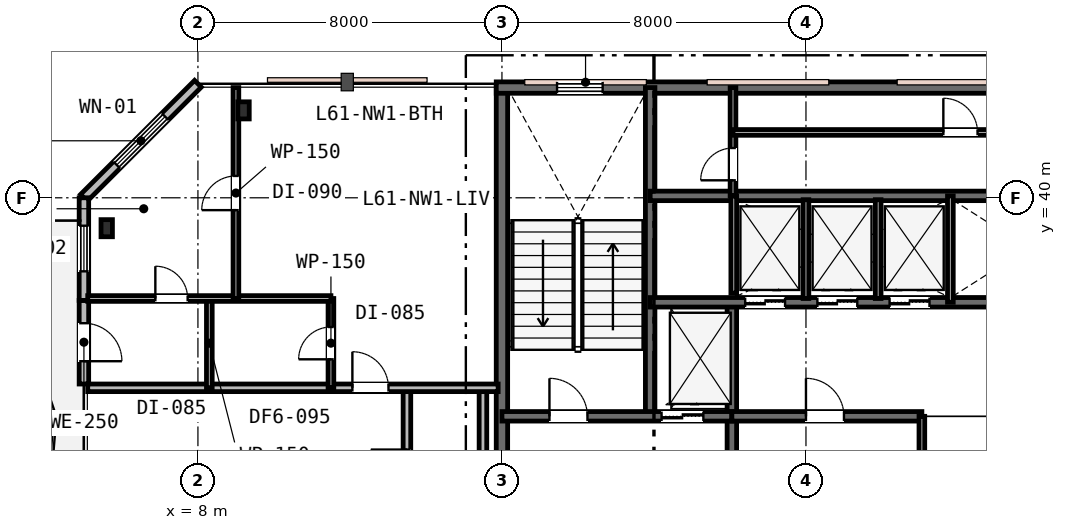
"""IFC4 building model, lengths in metres.
Left out: names, types, materials, properties, quantities, classifications, styles, units other than length and angle.
Written with IfcOpenShell. Run it as: python <this file> out.ifc"""

import sys

from ifc_helpers import new_model, si_unit, direction, frame, frame_2d, origin, origin_2d, place, context, subcontext, project, spatial, rectangle, i_section, extrude, element, fill, save


model = new_model("IFC4")
c1 = context("Model", 3, precision=1e-05, world=origin(), true_north=direction((0.0, 1.0)))
c2 = subcontext(c1, "Body", "Model", "MODEL_VIEW")
j1 = project(units=[si_unit("LENGTHUNIT", "METRE"), si_unit("PLANEANGLEUNIT", "RADIAN")], contexts=[c1])
p1 = place(None, origin())
s1 = spatial("IfcSite", under=j1, at=p1, CompositionType="ELEMENT")
p2 = place(p1, origin())
s2 = spatial("IfcBuilding", under=s1, at=p2, CompositionType="ELEMENT")
p3 = place(p2, frame((0.0, 0.0, 237.4)))
s3 = spatial("IfcBuildingStorey", under=s2, at=p3, CompositionType="ELEMENT", Elevation=237.4)
p4 = place(p3, frame((16.0, 30.65, 0.0), z_axis=(0.0, 0.0, 1.0), x_axis=(0.0, 1.0, 0.0)))
e1 = element("IfcWall", 1, at=p4, inside=s3, PredefinedType="SHEAR", context=c2, shape_type="SweptSolid", body=[
    extrude(rectangle(XDim=12.3, YDim=0.3, at=frame_2d((6.15, 0.0))), origin(), (0.0, 0.0, 1.0), 3.8),
])
p5 = place(p3, frame((15.85, 42.9, 0.0), z_axis=(0.0, 0.0, 1.0), x_axis=(1.0, 0.0, 0.0)))
e2 = element("IfcWall", 2, at=p5, inside=s3, PredefinedType="SHEAR", context=c2, shape_type="SweptSolid", body=[
    extrude(rectangle(XDim=24.3, YDim=0.3, at=frame_2d((12.15, 0.0))), origin(), (0.0, 0.0, 1.0), 3.8),
])
p6 = place(p5, frame((1.6, 0.0, 0.95)))
e3 = element("IfcOpeningElement", 3, at=p6, cuts=e2, PredefinedType="OPENING", context=c2, shape_type="SweptSolid", body=[
    extrude(rectangle(XDim=1.2, YDim=1.6, at=frame_2d((0.6, 0.8))), frame((0.0, 0.16, 0.0), z_axis=(0.0, -1.0, 0.0), x_axis=(1.0, 0.0, 0.0)), (0.0, 0.0, 1.0), 0.32),
])
p7 = place(p5, frame((16.5, 0.0, 0.95)))
e4 = element("IfcOpeningElement", 4, at=p7, cuts=e2, PredefinedType="OPENING", context=c2, shape_type="SweptSolid", body=[
    extrude(rectangle(XDim=1.2, YDim=1.6, at=frame_2d((0.6, 0.8))), frame((0.0, 0.16, 0.0), z_axis=(0.0, -1.0, 0.0), x_axis=(1.0, 0.0, 0.0)), (0.0, 0.0, 1.0), 0.32),
])
p8 = place(p5, frame((21.6, 0.0, 0.95)))
e5 = element("IfcOpeningElement", 5, at=p8, cuts=e2, PredefinedType="OPENING", context=c2, shape_type="SweptSolid", body=[
    extrude(rectangle(XDim=1.2, YDim=1.6, at=frame_2d((0.6, 0.8))), frame((0.0, 0.16, 0.0), z_axis=(0.0, -1.0, 0.0), x_axis=(1.0, 0.0, 0.0)), (0.0, 0.0, 1.0), 0.32),
])
p9 = place(p3, frame((19.9, 34.25, 0.0), z_axis=(0.0, 0.0, 1.0), x_axis=(0.0, 1.0, 0.0)))
e6 = element("IfcWall", 6, at=p9, inside=s3, PredefinedType="SHEAR", context=c2, shape_type="SweptSolid", body=[
    extrude(rectangle(XDim=8.65, YDim=0.25, at=frame_2d((4.325, 0.0))), origin(), (0.0, 0.0, 1.0), 3.8),
])
p10 = place(p3, frame((22.05, 30.8, 0.0), z_axis=(0.0, 0.0, 1.0), x_axis=(0.0, 1.0, 0.0)))
e7 = element("IfcWall", 7, at=p10, inside=s3, PredefinedType="SHEAR", context=c2, shape_type="SweptSolid", body=[
    extrude(rectangle(XDim=6.45, YDim=0.25, at=frame_2d((3.225, 0.0))), origin(), (0.0, 0.0, 1.0), 3.8),
])
p11 = place(p3, frame((16.0, 34.25, 0.0), z_axis=(0.0, 0.0, 1.0), x_axis=(1.0, 0.0, 0.0)))
e8 = element("IfcWall", 8, at=p11, inside=s3, PredefinedType="SHEAR", context=c2, shape_type="SweptSolid", body=[
    extrude(rectangle(XDim=6.05, YDim=0.25, at=frame_2d((3.025, 0.0))), origin(), (0.0, 0.0, 1.0), 3.8),
])
p12 = place(p11, frame((1.25, 0.0, 0.0)))
e9 = element("IfcOpeningElement", 9, at=p12, cuts=e8, PredefinedType="OPENING", context=c2, shape_type="SweptSolid", body=[
    extrude(rectangle(XDim=1.0, YDim=2.15, at=frame_2d((0.5, 1.075))), frame((0.0, 0.135, 0.0), z_axis=(0.0, -1.0, 0.0), x_axis=(1.0, 0.0, 0.0)), (0.0, 0.0, 1.0), 0.27),
])
p13 = place(p11, frame((4.2, 0.0, 0.0)))
e10 = element("IfcOpeningElement", 10, at=p13, cuts=e8, PredefinedType="OPENING", context=c2, shape_type="SweptSolid", body=[
    extrude(rectangle(XDim=1.1, YDim=2.15, at=frame_2d((0.55, 1.075))), frame((0.0, 0.135, 0.0), z_axis=(0.0, -1.0, 0.0), x_axis=(1.0, 0.0, 0.0)), (0.0, 0.0, 1.0), 0.27),
])
p14 = place(p3, frame((22.05, 34.25, 0.0), z_axis=(0.0, 0.0, 1.0), x_axis=(1.0, 0.0, 0.0)))
e11 = element("IfcWall", 11, at=p14, inside=s3, PredefinedType="SHEAR", context=c2, shape_type="SweptSolid", body=[
    extrude(rectangle(XDim=5.0, YDim=0.25, at=frame_2d((2.5, 0.0))), origin(), (0.0, 0.0, 1.0), 3.8),
])
p15 = place(p14, frame((1.95, 0.0, 0.0)))
e12 = element("IfcOpeningElement", 12, at=p15, cuts=e11, PredefinedType="OPENING", context=c2, shape_type="SweptSolid", body=[
    extrude(rectangle(XDim=1.0, YDim=2.15, at=frame_2d((0.5, 1.075))), frame((0.0, 0.135, 0.0), z_axis=(0.0, -1.0, 0.0), x_axis=(1.0, 0.0, 0.0)), (0.0, 0.0, 1.0), 0.27),
])
p16 = place(p3, frame((19.9, 37.25, 0.0), z_axis=(0.0, 0.0, 1.0), x_axis=(1.0, 0.0, 0.0)))
e13 = element("IfcWall", 13, at=p16, inside=s3, PredefinedType="SHEAR", context=c2, shape_type="SweptSolid", body=[
    extrude(rectangle(XDim=16.2, YDim=0.25, at=frame_2d((8.1, 0.0))), origin(), (0.0, 0.0, 1.0), 3.8),
])
p17 = place(p16, frame((12.55, 0.0, 0.0)))
e14 = element("IfcOpeningElement", 14, at=p17, cuts=e13, PredefinedType="OPENING", context=c2, shape_type="SweptSolid", body=[
    extrude(rectangle(XDim=0.9, YDim=2.15, at=frame_2d((0.45, 1.075))), frame((0.0, 0.135, 0.0), z_axis=(0.0, -1.0, 0.0), x_axis=(1.0, 0.0, 0.0)), (0.0, 0.0, 1.0), 0.27),
])
p18 = place(p16, frame((2.5, 0.0, 0.0)))
e15 = element("IfcOpeningElement", 15, at=p18, cuts=e13, PredefinedType="OPENING", context=c2, shape_type="SweptSolid", body=[
    extrude(rectangle(XDim=1.05, YDim=2.15, at=frame_2d((0.525, 1.075))), frame((0.0, 0.135, 0.0), z_axis=(0.0, -1.0, 0.0), x_axis=(1.0, 0.0, 0.0)), (0.0, 0.0, 1.0), 0.27),
])
p19 = place(p16, frame((4.4, 0.0, 0.0)))
e16 = element("IfcOpeningElement", 16, at=p19, cuts=e13, PredefinedType="OPENING", context=c2, shape_type="SweptSolid", body=[
    extrude(rectangle(XDim=1.05, YDim=2.15, at=frame_2d((0.525, 1.075))), frame((0.0, 0.135, 0.0), z_axis=(0.0, -1.0, 0.0), x_axis=(1.0, 0.0, 0.0)), (0.0, 0.0, 1.0), 0.27),
])
p20 = place(p16, frame((6.3, 0.0, 0.0)))
e17 = element("IfcOpeningElement", 17, at=p20, cuts=e13, PredefinedType="OPENING", context=c2, shape_type="SweptSolid", body=[
    extrude(rectangle(XDim=1.05, YDim=2.15, at=frame_2d((0.525, 1.075))), frame((0.0, 0.135, 0.0), z_axis=(0.0, -1.0, 0.0), x_axis=(1.0, 0.0, 0.0)), (0.0, 0.0, 1.0), 0.27),
])
p21 = place(p3, frame((19.9, 40.05, 0.0), z_axis=(0.0, 0.0, 1.0), x_axis=(1.0, 0.0, 0.0)))
e18 = element("IfcWall", 18, at=p21, inside=s3, PredefinedType="SHEAR", context=c2, shape_type="SweptSolid", body=[
    extrude(rectangle(XDim=12.05, YDim=0.25, at=frame_2d((6.025, 0.0))), origin(), (0.0, 0.0, 1.0), 3.8),
])
for number, where, z_axis, x_axis in (
    (19, (5.6, 39.2, 0.0), (0.0, 0.0, 1.0), (1.0, 0.0, 0.0)),
    (20, (9.2, 42.3, 0.0), (0.0, 0.0, 1.0), (1.0, 0.0, 0.0)),
):
    element("IfcColumn", number, at=place(p3, frame(where, z_axis=z_axis, x_axis=x_axis)), inside=s3, PredefinedType="COLUMN", context=c2, shape_type="SweptSolid", body=[
        extrude(i_section(OverallWidth=0.3, OverallDepth=0.45, WebThickness=0.014, FlangeThickness=0.026, FilletRadius=0.027, at=origin_2d()), origin(), (0.0, 0.0, 1.0), 3.8),
    ])
p22 = place(p3, frame((8.0, 43.0, 0.0), z_axis=(0.0, 0.0, 1.0), x_axis=(-0.707106781187, -0.707106781187, 0.0)))
e21 = element("IfcWall", 21, at=p22, inside=s3, PredefinedType="STANDARD", context=c2, shape_type="SweptSolid", body=[
    extrude(rectangle(XDim=4.243, YDim=0.25, at=frame_2d((2.121, 0.0))), origin(), (0.0, 0.0, 1.0), 3.53),
])
p23 = place(p22, frame((1.221, 0.0, 0.75)))
e22 = element("IfcOpeningElement", 22, at=p23, cuts=e21, PredefinedType="OPENING", context=c2, shape_type="SweptSolid", body=[
    extrude(rectangle(XDim=1.8, YDim=1.85, at=frame_2d((0.9, 0.925))), frame((0.0, 0.135, 0.0), z_axis=(0.0, -1.0, 0.0), x_axis=(1.0, 0.0, 0.0)), (0.0, 0.0, 1.0), 0.27),
])
p24 = place(p3, frame((5.0, 37.3, 0.0), z_axis=(0.0, 0.0, 1.0), x_axis=(0.0, -1.0, 0.0)))
e23 = element("IfcWall", 23, at=p24, inside=s3, PredefinedType="STANDARD", context=c2, shape_type="SweptSolid", body=[
    extrude(rectangle(XDim=2.2, YDim=0.25, at=frame_2d((1.1, 0.0))), origin(), (0.0, 0.0, 1.0), 3.53),
])
p25 = place(p24, frame((0.6, 0.0, 0.0)))
e24 = element("IfcOpeningElement", 24, at=p25, cuts=e23, PredefinedType="OPENING", context=c2, shape_type="SweptSolid", body=[
    extrude(rectangle(XDim=1.0, YDim=2.15, at=frame_2d((0.5, 1.075))), frame((0.0, 0.135, 0.0), z_axis=(0.0, -1.0, 0.0), x_axis=(1.0, 0.0, 0.0)), (0.0, 0.0, 1.0), 0.27),
])
p26 = place(p3, frame((5.0, 40.0, 0.0), z_axis=(0.0, 0.0, 1.0), x_axis=(0.0, -1.0, 0.0)))
e25 = element("IfcWall", 25, at=p26, inside=s3, PredefinedType="STANDARD", context=c2, shape_type="SweptSolid", body=[
    extrude(rectangle(XDim=2.7, YDim=0.25, at=frame_2d((1.35, 0.0))), origin(), (0.0, 0.0, 1.0), 3.53),
])
p27 = place(p26, frame((0.735, 0.0, 0.85)))
e26 = element("IfcOpeningElement", 26, at=p27, cuts=e25, PredefinedType="OPENING", context=c2, shape_type="SweptSolid", body=[
    extrude(rectangle(XDim=1.2, YDim=1.6, at=frame_2d((0.6, 0.8))), frame((0.0, 0.135, 0.0), z_axis=(0.0, -1.0, 0.0), x_axis=(1.0, 0.0, 0.0)), (0.0, 0.0, 1.0), 0.27),
])
p28 = place(p3, frame((27.05, 30.8, 0.0), z_axis=(0.0, 0.0, 1.0), x_axis=(0.0, 1.0, 0.0)))
e27 = element("IfcWall", 27, at=p28, inside=s3, PredefinedType="PLUMBINGWALL", context=c2, shape_type="SweptSolid", body=[
    extrude(rectangle(XDim=3.45, YDim=0.15, at=frame_2d((1.725, 0.0))), origin(), (0.0, 0.0, 1.0), 3.22),
])
p29 = place(p3, frame((22.1, 37.49, 0.0), z_axis=(0.0, 0.0, 1.0), x_axis=(0.0, 1.0, 0.0)))
e28 = element("IfcWall", 28, at=p29, inside=s3, PredefinedType="PLUMBINGWALL", context=c2, shape_type="SweptSolid", body=[
    extrude(rectangle(XDim=2.56, YDim=0.15, at=frame_2d((1.28, 0.0))), origin(), (0.0, 0.0, 1.0), 3.53),
])
p30 = place(p3, frame((27.8, 37.25, 0.0), z_axis=(0.0, 0.0, 1.0), x_axis=(0.0, 1.0, 0.0)))
e29 = element("IfcWall", 29, at=p30, inside=s3, PredefinedType="PLUMBINGWALL", context=c2, shape_type="SweptSolid", body=[
    extrude(rectangle(XDim=2.8, YDim=0.15, at=frame_2d((1.4, 0.0))), origin(), (0.0, 0.0, 1.0), 3.53),
])
for number, where, z_axis, x_axis in (
    (30, (24.0, 37.35, 0.0), (0.0, 0.0, 1.0), (0.0, 1.0, 0.0)),
    (31, (25.9, 37.35, 0.0), (0.0, 0.0, 1.0), (0.0, 1.0, 0.0)),
):
    element("IfcWall", number, at=place(p3, frame(where, z_axis=z_axis, x_axis=x_axis)), inside=s3, PredefinedType="PLUMBINGWALL", context=c2, shape_type="SweptSolid", body=[
        extrude(rectangle(XDim=2.6, YDim=0.15, at=frame_2d((1.3, 0.0))), origin(), (0.0, 0.0, 1.0), 3.53),
    ])
p31 = place(p3, frame((22.08, 40.05, 0.0), z_axis=(0.0, 0.0, 1.0), x_axis=(0.0, 1.0, 0.0)))
e32 = element("IfcWall", 32, at=p31, inside=s3, PredefinedType="PARTITIONING", context=c2, shape_type="SweptSolid", body=[
    extrude(rectangle(XDim=2.85, YDim=0.15, at=frame_2d((1.425, 0.0))), origin(), (0.0, 0.0, 1.0), 3.53),
])
p32 = place(p31, frame((0.41, 0.0, 0.0)))
e33 = element("IfcOpeningElement", 33, at=p32, cuts=e32, PredefinedType="OPENING", context=c2, shape_type="SweptSolid", body=[
    extrude(rectangle(XDim=0.85, YDim=2.15, at=frame_2d((0.425, 1.075))), frame((0.0, 0.085, 0.0), z_axis=(0.0, -1.0, 0.0), x_axis=(1.0, 0.0, 0.0)), (0.0, 0.0, 1.0), 0.17),
])
p33 = place(p3, frame((22.08, 41.72, 0.0), z_axis=(0.0, 0.0, 1.0), x_axis=(1.0, 0.0, 0.0)))
e34 = element("IfcWall", 34, at=p33, inside=s3, PredefinedType="PARTITIONING", context=c2, shape_type="SweptSolid", body=[
    extrude(rectangle(XDim=11.97, YDim=0.15, at=frame_2d((5.985, 0.0))), origin(), (0.0, 0.0, 1.0), 3.53),
])
p34 = place(p33, frame((5.535, 0.0, 0.0)))
e35 = element("IfcOpeningElement", 35, at=p34, cuts=e34, PredefinedType="OPENING", context=c2, shape_type="SweptSolid", body=[
    extrude(rectangle(XDim=0.9, YDim=2.15, at=frame_2d((0.45, 1.075))), frame((0.0, 0.085, 0.0), z_axis=(0.0, -1.0, 0.0), x_axis=(1.0, 0.0, 0.0)), (0.0, 0.0, 1.0), 0.17),
])
p35 = place(p3, frame((15.5, 30.8, 0.0), z_axis=(0.0, 0.0, 1.0), x_axis=(0.0, 1.0, 0.0)))
e36 = element("IfcWall", 36, at=p35, inside=s3, PredefinedType="PARTITIONING", context=c2, shape_type="SweptSolid", body=[
    extrude(rectangle(XDim=4.2, YDim=0.2, at=frame_2d((2.1, 0.0))), origin(), (0.0, 0.0, 1.0), 2.92),
])
p36 = place(p3, frame((13.5, 28.6, 0.0), z_axis=(0.0, 0.0, 1.0), x_axis=(0.0, 1.0, 0.0)))
e37 = element("IfcWall", 37, at=p36, inside=s3, PredefinedType="PARTITIONING", context=c2, shape_type="SweptSolid", body=[
    extrude(rectangle(XDim=6.4, YDim=0.2, at=frame_2d((3.2, 0.0))), origin(), (0.0, 0.0, 1.0), 2.92),
])
p37 = place(p36, frame((3.825, 0.0, 0.0)))
e38 = element("IfcOpeningElement", 38, at=p37, cuts=e37, PredefinedType="OPENING", context=c2, shape_type="SweptSolid", body=[
    extrude(rectangle(XDim=0.95, YDim=2.15, at=frame_2d((0.475, 1.075))), frame((0.0, 0.11, 0.0), z_axis=(0.0, -1.0, 0.0), x_axis=(1.0, 0.0, 0.0)), (0.0, 0.0, 1.0), 0.22),
])
p38 = place(p3, frame((5.1, 35.0, 0.0), z_axis=(0.0, 0.0, 1.0), x_axis=(1.0, 0.0, 0.0)))
e39 = element("IfcWall", 39, at=p38, inside=s3, PredefinedType="PARTITIONING", context=c2, shape_type="SweptSolid", body=[
    extrude(rectangle(XDim=10.8, YDim=0.2, at=frame_2d((5.4, 0.0))), origin(), (0.0, 0.0, 1.0), 3.24),
])
p39 = place(p38, frame((6.964, 0.0, 0.0)))
e40 = element("IfcOpeningElement", 40, at=p39, cuts=e39, PredefinedType="OPENING", context=c2, shape_type="SweptSolid", body=[
    extrude(rectangle(XDim=0.95, YDim=2.15, at=frame_2d((0.475, 1.075))), frame((0.0, 0.11, 0.0), z_axis=(0.0, -1.0, 0.0), x_axis=(1.0, 0.0, 0.0)), (0.0, 0.0, 1.0), 0.22),
])
p40 = place(p3, frame((11.5, 35.0, 0.0), z_axis=(0.0, 0.0, 1.0), x_axis=(0.0, 1.0, 0.0)))
e41 = element("IfcWall", 41, at=p40, inside=s3, PredefinedType="PARTITIONING", context=c2, shape_type="SweptSolid", body=[
    extrude(rectangle(XDim=2.35, YDim=0.15, at=frame_2d((1.175, 0.0))), origin(), (0.0, 0.0, 1.0), 3.53),
])
p41 = place(p40, frame((0.75, 0.0, 0.0)))
e42 = element("IfcOpeningElement", 42, at=p41, cuts=e41, PredefinedType="OPENING", context=c2, shape_type="SweptSolid", body=[
    extrude(rectangle(XDim=0.85, YDim=2.15, at=frame_2d((0.425, 1.075))), frame((0.0, 0.085, 0.0), z_axis=(0.0, -1.0, 0.0), x_axis=(1.0, 0.0, 0.0)), (0.0, 0.0, 1.0), 0.17),
])
p42 = place(p3, frame((8.3, 35.0, 0.0), z_axis=(0.0, 0.0, 1.0), x_axis=(0.0, 1.0, 0.0)))
e43 = element("IfcWall", 43, at=p42, inside=s3, PredefinedType="PARTITIONING", context=c2, shape_type="SweptSolid", body=[
    extrude(rectangle(XDim=2.35, YDim=0.15, at=frame_2d((1.175, 0.0))), origin(), (0.0, 0.0, 1.0), 3.53),
])
p43 = place(p3, frame((5.1, 37.35, 0.0), z_axis=(0.0, 0.0, 1.0), x_axis=(1.0, 0.0, 0.0)))
e44 = element("IfcWall", 44, at=p43, inside=s3, PredefinedType="PARTITIONING", context=c2, shape_type="SweptSolid", body=[
    extrude(rectangle(XDim=6.4, YDim=0.15, at=frame_2d((3.2, 0.0))), origin(), (0.0, 0.0, 1.0), 3.24),
])
p44 = place(p43, frame((1.78, 0.0, 0.0)))
e45 = element("IfcOpeningElement", 45, at=p44, cuts=e44, PredefinedType="OPENING", context=c2, shape_type="SweptSolid", body=[
    extrude(rectangle(XDim=0.85, YDim=2.15, at=frame_2d((0.425, 1.075))), frame((0.0, 0.085, 0.0), z_axis=(0.0, -1.0, 0.0), x_axis=(1.0, 0.0, 0.0)), (0.0, 0.0, 1.0), 0.17),
])
p45 = place(p3, frame((9.0, 37.35, 0.0), z_axis=(0.0, 0.0, 1.0), x_axis=(0.0, 1.0, 0.0)))
e46 = element("IfcWall", 46, at=p45, inside=s3, PredefinedType="PARTITIONING", context=c2, shape_type="SweptSolid", body=[
    extrude(rectangle(XDim=5.55, YDim=0.15, at=frame_2d((2.775, 0.0))), origin(), (0.0, 0.0, 1.0), 3.24),
])
p46 = place(p45, frame((2.325, 0.0, 0.0)))
e47 = element("IfcOpeningElement", 47, at=p46, cuts=e46, PredefinedType="OPENING", context=c2, shape_type="SweptSolid", body=[
    extrude(rectangle(XDim=0.9, YDim=2.15, at=frame_2d((0.45, 1.075))), frame((0.0, 0.085, 0.0), z_axis=(0.0, -1.0, 0.0), x_axis=(1.0, 0.0, 0.0)), (0.0, 0.0, 1.0), 0.17),
])
p47 = place(p6, origin())
e48 = element("IfcWindow", 48, at=p47, inside=s3, PartitioningType="SINGLE_PANEL", PredefinedType="WINDOW", context=c2, shape_type="SweptSolid", body=[
    extrude(rectangle(XDim=1.2, YDim=1.6, at=frame_2d((0.6, 0.8))), frame((0.0, 0.03, 0.0), z_axis=(0.0, -1.0, 0.0), x_axis=(1.0, 0.0, 0.0)), (0.0, 0.0, 1.0), 0.06),
])
fill(e3, e48)
p48 = place(p23, origin())
e49 = element("IfcWindow", 49, at=p48, inside=s3, PartitioningType="SINGLE_PANEL", PredefinedType="WINDOW", context=c2, shape_type="SweptSolid", body=[
    extrude(rectangle(XDim=1.8, YDim=1.85, at=frame_2d((0.9, 0.925))), frame((0.0, 0.03, 0.0), z_axis=(0.0, -1.0, 0.0), x_axis=(1.0, 0.0, 0.0)), (0.0, 0.0, 1.0), 0.06),
])
fill(e22, e49)
p49 = place(p25, origin())
e50 = element("IfcDoor", 50, at=p49, inside=s3, OperationType="SINGLE_SWING_RIGHT", PredefinedType="DOOR", context=c2, shape_type="SweptSolid", body=[
    extrude(rectangle(XDim=1.0, YDim=2.15, at=frame_2d((0.5, 1.075))), frame((0.0, 0.025, 0.0), z_axis=(0.0, -1.0, 0.0), x_axis=(1.0, 0.0, 0.0)), (0.0, 0.0, 1.0), 0.05),
])
fill(e24, e50)
p50 = place(p27, origin())
e51 = element("IfcWindow", 51, at=p50, inside=s3, PartitioningType="SINGLE_PANEL", PredefinedType="WINDOW", context=c2, shape_type="SweptSolid", body=[
    extrude(rectangle(XDim=1.2, YDim=1.6, at=frame_2d((0.6, 0.8))), frame((0.0, 0.03, 0.0), z_axis=(0.0, -1.0, 0.0), x_axis=(1.0, 0.0, 0.0)), (0.0, 0.0, 1.0), 0.06),
])
fill(e26, e51)
p51 = place(p12, origin())
e52 = element("IfcDoor", 52, at=p51, inside=s3, OperationType="SINGLE_SWING_LEFT", PredefinedType="DOOR", context=c2, shape_type="SweptSolid", body=[
    extrude(rectangle(XDim=1.0, YDim=2.15, at=frame_2d((0.5, 1.075))), frame((0.0, 0.025, 0.0), z_axis=(0.0, -1.0, 0.0), x_axis=(1.0, 0.0, 0.0)), (0.0, 0.0, 1.0), 0.05),
])
fill(e9, e52)
p52 = place(p15, origin())
e53 = element("IfcDoor", 53, at=p52, inside=s3, OperationType="SINGLE_SWING_LEFT", PredefinedType="DOOR", context=c2, shape_type="SweptSolid", body=[
    extrude(rectangle(XDim=1.0, YDim=2.15, at=frame_2d((0.5, 1.075))), frame((0.0, 0.025, 0.0), z_axis=(0.0, -1.0, 0.0), x_axis=(1.0, 0.0, 0.0)), (0.0, 0.0, 1.0), 0.05),
])
fill(e12, e53)
p53 = place(p32, origin())
e54 = element("IfcDoor", 54, at=p53, inside=s3, OperationType="SINGLE_SWING_LEFT", PredefinedType="DOOR", context=c2, shape_type="SweptSolid", body=[
    extrude(rectangle(XDim=0.85, YDim=2.15, at=frame_2d((0.425, 1.075))), frame((0.0, 0.025, 0.0), z_axis=(0.0, -1.0, 0.0), x_axis=(1.0, 0.0, 0.0)), (0.0, 0.0, 1.0), 0.05),
])
fill(e33, e54)
p54 = place(p34, origin())
e55 = element("IfcDoor", 55, at=p54, inside=s3, OperationType="SINGLE_SWING_LEFT", PredefinedType="DOOR", context=c2, shape_type="SweptSolid", body=[
    extrude(rectangle(XDim=0.9, YDim=2.15, at=frame_2d((0.45, 1.075))), frame((0.0, 0.025, 0.0), z_axis=(0.0, -1.0, 0.0), x_axis=(1.0, 0.0, 0.0)), (0.0, 0.0, 1.0), 0.05),
])
fill(e35, e55)
p55 = place(p37, origin())
e56 = element("IfcDoor", 56, at=p55, inside=s3, OperationType="SINGLE_SWING_RIGHT", PredefinedType="DOOR", context=c2, shape_type="SweptSolid", body=[
    extrude(rectangle(XDim=0.95, YDim=2.15, at=frame_2d((0.475, 1.075))), frame((0.0, 0.025, 0.0), z_axis=(0.0, -1.0, 0.0), x_axis=(1.0, 0.0, 0.0)), (0.0, 0.0, 1.0), 0.05),
])
fill(e38, e56)
p56 = place(p39, origin())
e57 = element("IfcDoor", 57, at=p56, inside=s3, OperationType="SINGLE_SWING_LEFT", PredefinedType="DOOR", context=c2, shape_type="SweptSolid", body=[
    extrude(rectangle(XDim=0.95, YDim=2.15, at=frame_2d((0.475, 1.075))), frame((0.0, 0.025, 0.0), z_axis=(0.0, -1.0, 0.0), x_axis=(1.0, 0.0, 0.0)), (0.0, 0.0, 1.0), 0.05),
])
fill(e40, e57)
p57 = place(p41, origin())
e58 = element("IfcDoor", 58, at=p57, inside=s3, OperationType="SINGLE_SWING_LEFT", PredefinedType="DOOR", context=c2, shape_type="SweptSolid", body=[
    extrude(rectangle(XDim=0.85, YDim=2.15, at=frame_2d((0.425, 1.075))), frame((0.0, 0.025, 0.0), z_axis=(0.0, -1.0, 0.0), x_axis=(1.0, 0.0, 0.0)), (0.0, 0.0, 1.0), 0.05),
])
fill(e42, e58)
p58 = place(p44, origin())
e59 = element("IfcDoor", 59, at=p58, inside=s3, OperationType="SINGLE_SWING_LEFT", PredefinedType="DOOR", context=c2, shape_type="SweptSolid", body=[
    extrude(rectangle(XDim=0.85, YDim=2.15, at=frame_2d((0.425, 1.075))), frame((0.0, 0.025, 0.0), z_axis=(0.0, -1.0, 0.0), x_axis=(1.0, 0.0, 0.0)), (0.0, 0.0, 1.0), 0.05),
])
fill(e45, e59)
p59 = place(p46, origin())
e60 = element("IfcDoor", 60, at=p59, inside=s3, OperationType="SINGLE_SWING_LEFT", PredefinedType="DOOR", context=c2, shape_type="SweptSolid", body=[
    extrude(rectangle(XDim=0.9, YDim=2.15, at=frame_2d((0.45, 1.075))), frame((0.0, 0.025, 0.0), z_axis=(0.0, -1.0, 0.0), x_axis=(1.0, 0.0, 0.0)), (0.0, 0.0, 1.0), 0.05),
])
fill(e47, e60)
p60 = place(p13, origin())
e61 = element("IfcDoor", 61, at=p60, inside=s3, OperationType="DOUBLE_DOOR_SLIDING", PredefinedType="DOOR", context=c2, shape_type="SweptSolid", body=[
    extrude(rectangle(XDim=1.1, YDim=2.15, at=frame_2d((0.55, 1.075))), frame((0.0, 0.025, 0.0), z_axis=(0.0, -1.0, 0.0), x_axis=(1.0, 0.0, 0.0)), (0.0, 0.0, 1.0), 0.05),
])
fill(e10, e61)
p61 = place(p18, origin())
e62 = element("IfcDoor", 62, at=p61, inside=s3, OperationType="DOUBLE_DOOR_SLIDING", PredefinedType="DOOR", context=c2, shape_type="SweptSolid", body=[
    extrude(rectangle(XDim=1.05, YDim=2.15, at=frame_2d((0.525, 1.075))), frame((0.0, 0.025, 0.0), z_axis=(0.0, -1.0, 0.0), x_axis=(1.0, 0.0, 0.0)), (0.0, 0.0, 1.0), 0.05),
])
fill(e15, e62)
p62 = place(p19, origin())
e63 = element("IfcDoor", 63, at=p62, inside=s3, OperationType="DOUBLE_DOOR_SLIDING", PredefinedType="DOOR", context=c2, shape_type="SweptSolid", body=[
    extrude(rectangle(XDim=1.05, YDim=2.15, at=frame_2d((0.525, 1.075))), frame((0.0, 0.025, 0.0), z_axis=(0.0, -1.0, 0.0), x_axis=(1.0, 0.0, 0.0)), (0.0, 0.0, 1.0), 0.05),
])
fill(e16, e63)
p63 = place(p20, origin())
e64 = element("IfcDoor", 64, at=p63, inside=s3, OperationType="DOUBLE_DOOR_SLIDING", PredefinedType="DOOR", context=c2, shape_type="SweptSolid", body=[
    extrude(rectangle(XDim=1.05, YDim=2.15, at=frame_2d((0.525, 1.075))), frame((0.0, 0.025, 0.0), z_axis=(0.0, -1.0, 0.0), x_axis=(1.0, 0.0, 0.0)), (0.0, 0.0, 1.0), 0.05),
])
fill(e17, e64)
save(model, sys.argv[1])
